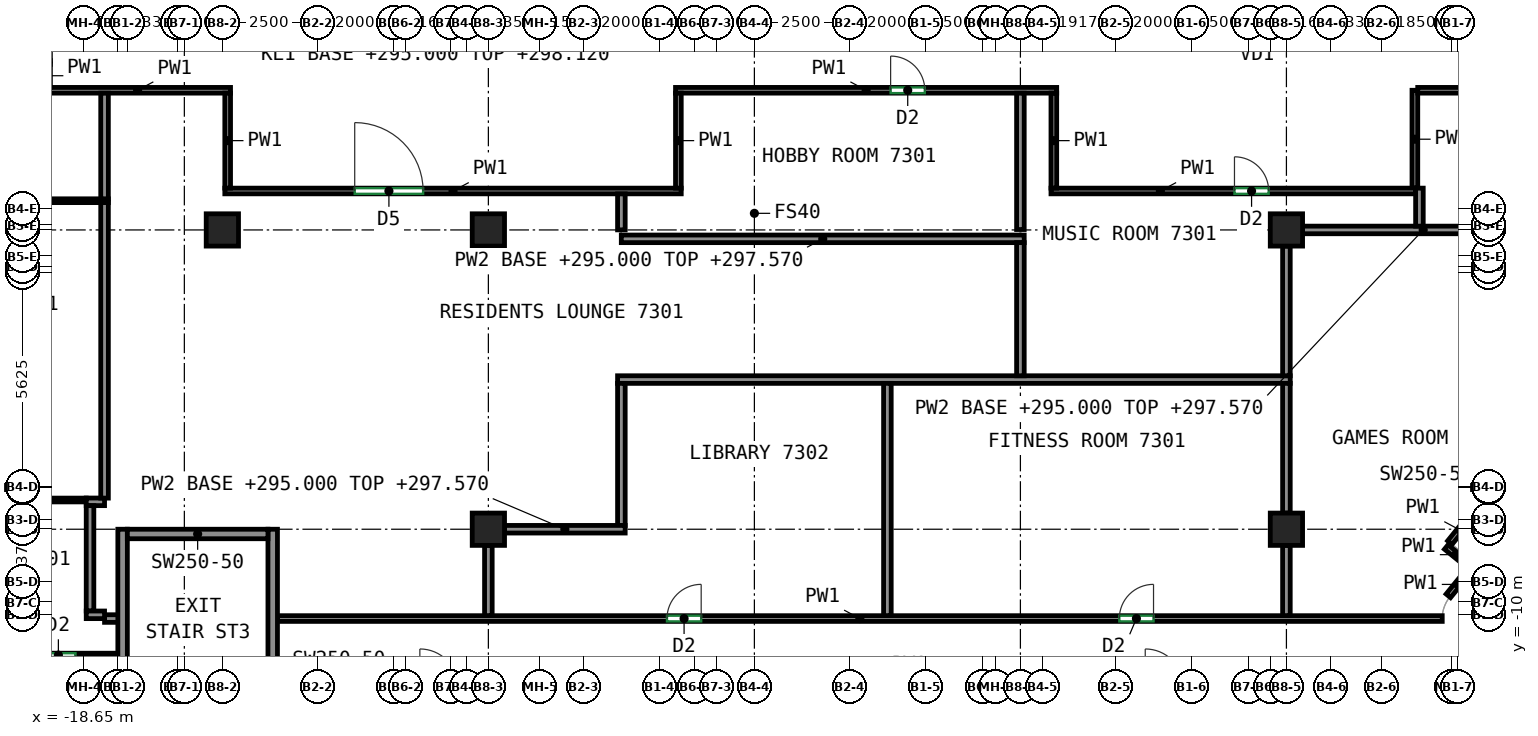
"""IFC4 building model, lengths in metres.
Left out: names, types, materials, properties, quantities, classifications, styles, units other than length and angle.
Written with IfcOpenShell. Run it as: python <this file> out.ifc"""

import sys

from ifc_helpers import new_model, si_unit, direction, frame, frame_2d, origin, origin_2d, place, context, subcontext, project, spatial, rectangle, extrude, source, transform, mapped, element, fill, save


model = new_model("IFC4")
c1 = context("Model", 3, precision=1e-05, world=origin(), true_north=direction((0.0, 1.0)))
c2 = subcontext(c1, "Body", "Model", "MODEL_VIEW")
j1 = project(units=[si_unit("LENGTHUNIT", "METRE"), si_unit("PLANEANGLEUNIT", "RADIAN")], contexts=[c1])
p1 = place(None, origin())
s1 = spatial("IfcSite", under=j1, at=p1, CompositionType="ELEMENT")
p2 = place(p1, origin())
s2 = spatial("IfcBuilding", under=s1, at=p2, CompositionType="ELEMENT")
p3 = place(p2, frame((0.0, 0.0, 295.0)))
s3 = spatial("IfcBuildingStorey", under=s2, at=p3, CompositionType="ELEMENT", Elevation=295.0)
m1 = source(origin(), c2, "Body", "SweptSolid", [
    extrude(rectangle(XDim=0.85, YDim=0.85, at=origin_2d()), origin(), (0.0, 0.0, 1.0), 3.12),
])
for number, where, z_axis, x_axis in (
    (1, (-15.0, 0.125, 0.0), (0.0, 0.0, 1.0), (1.0, 0.0, 0.0)),
    (2, (-8.0, -7.75, 0.0), (0.0, 0.0, 1.0), (1.0, 0.0, 0.0)),
    (3, (-8.0, 0.125, 0.0), (0.0, 0.0, 1.0), (1.0, 0.0, 0.0)),
    (4, (13.0, -7.75, 0.0), (0.0, 0.0, 1.0), (1.0, 0.0, 0.0)),
    (5, (13.0, 0.125, 0.0), (0.0, 0.0, 1.0), (1.0, 0.0, 0.0)),
):
    element("IfcColumn", number, at=place(p3, frame(where, z_axis=z_axis, x_axis=x_axis)), inside=s3, PredefinedType="COLUMN", context=c2, shape_type="MappedRepresentation", body=[
        mapped(m1, transform((0.0, 0.0, 0.0))),
    ])
m2 = source(origin(), c2, "Body", "SweptSolid", [
    extrude(rectangle(XDim=8.0, YDim=0.25, at=frame_2d((4.0, 0.0))), origin(), (0.0, 0.0, 1.0), 3.12),
])
for number, where, z_axis, x_axis in (
    (6, (-17.625, -15.75, 0.0), (0.0, 0.0, 1.0), (0.0, 1.0, 0.0)),
    (7, (-13.675, -15.75, 0.0), (0.0, 0.0, 1.0), (0.0, 1.0, 0.0)),
):
    element("IfcWall", number, at=place(p3, frame(where, z_axis=z_axis, x_axis=x_axis)), inside=s3, PredefinedType="SHEAR", context=c2, shape_type="MappedRepresentation", body=[
        mapped(m2, transform((0.0, 0.0, 0.0))),
    ])
m3 = source(origin(), c2, "Body", "SweptSolid", [
    extrude(rectangle(XDim=3.7, YDim=0.25, at=frame_2d((1.85, 0.0))), origin(), (0.0, 0.0, 1.0), 3.12),
])
p4 = place(p3, frame((-17.5, -7.875, 0.0), z_axis=(0.0, 0.0, 1.0), x_axis=(1.0, 0.0, 0.0)))
e8 = element("IfcWall", 8, at=p4, inside=s3, PredefinedType="SHEAR", context=c2, shape_type="MappedRepresentation", body=[
    mapped(m3, transform((0.0, 0.0, 0.0))),
])
p5 = place(p3, frame((-19.675, 3.8, 0.0), z_axis=(0.0, 0.0, 1.0), x_axis=(1.0, 0.0, 0.0)))
e9 = element("IfcWall", 9, at=p5, inside=s3, PredefinedType="PARTITIONING", context=c2, shape_type="SweptSolid", body=[
    extrude(rectangle(XDim=4.89, YDim=0.15, at=frame_2d((2.445, 0.0))), origin(), (0.0, 0.0, 1.0), 3.12),
])
p6 = place(p3, frame((-14.935, 1.15, 0.0), z_axis=(0.0, 0.0, 1.0), x_axis=(1.0, 0.0, 0.0)))
e10 = element("IfcWall", 10, at=p6, inside=s3, PredefinedType="PARTITIONING", context=c2, shape_type="SweptSolid", body=[
    extrude(rectangle(XDim=12.01, YDim=0.15, at=frame_2d((6.005, 0.0))), origin(), (0.0, 0.0, 1.0), 3.12),
])
p7 = place(p6, frame((3.418, 0.0, 0.0)))
e11 = element("IfcOpeningElement", 11, at=p7, cuts=e10, PredefinedType="OPENING", context=c2, shape_type="SweptSolid", body=[
    extrude(rectangle(XDim=1.8, YDim=2.1, at=frame_2d((0.9, 1.05))), frame((0.0, 0.085, 0.0), z_axis=(0.0, -1.0, 0.0), x_axis=(1.0, 0.0, 0.0)), (0.0, 0.0, 1.0), 0.17),
])
p8 = place(p3, frame((-14.86, 3.725, 0.0), z_axis=(0.0, 0.0, 1.0), x_axis=(0.0, -1.0, 0.0)))
e12 = element("IfcWall", 12, at=p8, inside=s3, PredefinedType="PARTITIONING", context=c2, shape_type="SweptSolid", body=[
    extrude(rectangle(XDim=2.5, YDim=0.15, at=frame_2d((1.25, 0.0))), origin(), (0.0, 0.0, 1.0), 3.12),
])
p9 = place(p3, frame((-13.55, -10.1, 0.0), z_axis=(0.0, 0.0, 1.0), x_axis=(1.0, 0.0, 0.0)))
e13 = element("IfcWall", 13, at=p9, inside=s3, PredefinedType="PARTITIONING", context=c2, shape_type="SweptSolid", body=[
    extrude(rectangle(XDim=30.65, YDim=0.15, at=frame_2d((15.325, 0.0))), origin(), (0.0, 0.0, 1.0), 3.12),
])
p10 = place(p9, frame((10.25, 0.0, 0.0)))
e14 = element("IfcOpeningElement", 14, at=p10, cuts=e13, PredefinedType="OPENING", context=c2, shape_type="SweptSolid", body=[
    extrude(rectangle(XDim=0.9, YDim=2.1, at=frame_2d((0.45, 1.05))), frame((0.0, 0.085, 0.0), z_axis=(0.0, -1.0, 0.0), x_axis=(1.0, 0.0, 0.0)), (0.0, 0.0, 1.0), 0.17),
])
p11 = place(p9, frame((22.153, 0.0, 0.0)))
e15 = element("IfcOpeningElement", 15, at=p11, cuts=e13, PredefinedType="OPENING", context=c2, shape_type="SweptSolid", body=[
    extrude(rectangle(XDim=0.9, YDim=2.1, at=frame_2d((0.45, 1.05))), frame((0.0, 0.085, 0.0), z_axis=(0.0, -1.0, 0.0), x_axis=(1.0, 0.0, 0.0)), (0.0, 0.0, 1.0), 0.17),
])
p12 = place(p3, frame((-3.075, 3.8, 0.0), z_axis=(0.0, 0.0, 1.0), x_axis=(1.0, 0.0, 0.0)))
e16 = element("IfcWall", 16, at=p12, inside=s3, PredefinedType="PARTITIONING", context=c2, shape_type="SweptSolid", body=[
    extrude(rectangle(XDim=10.03, YDim=0.15, at=frame_2d((5.015, 0.0))), origin(), (0.0, 0.0, 1.0), 3.12),
])
p13 = place(p12, frame((5.66, 0.0, 0.0)))
e17 = element("IfcOpeningElement", 17, at=p13, cuts=e16, PredefinedType="OPENING", context=c2, shape_type="SweptSolid", body=[
    extrude(rectangle(XDim=0.9, YDim=2.1, at=frame_2d((0.45, 1.05))), frame((0.0, 0.085, 0.0), z_axis=(0.0, -1.0, 0.0), x_axis=(1.0, 0.0, 0.0)), (0.0, 0.0, 1.0), 0.17),
])
p14 = place(p3, frame((-3.0, 1.225, 0.0), z_axis=(0.0, 0.0, 1.0), x_axis=(0.0, 1.0, 0.0)))
e18 = element("IfcWall", 18, at=p14, inside=s3, PredefinedType="PARTITIONING", context=c2, shape_type="SweptSolid", body=[
    extrude(rectangle(XDim=2.5, YDim=0.15, at=frame_2d((1.25, 0.0))), origin(), (0.0, 0.0, 1.0), 3.12),
])
p15 = place(p3, frame((16.38, 1.225, 0.0), z_axis=(0.0, 0.0, 1.0), x_axis=(0.0, 1.0, 0.0)))
e19 = element("IfcWall", 19, at=p15, inside=s3, PredefinedType="PARTITIONING", context=c2, shape_type="SweptSolid", body=[
    extrude(rectangle(XDim=2.575, YDim=0.15, at=frame_2d((1.288, 0.0))), origin(), (0.0, 0.0, 1.0), 3.12),
])
p16 = place(p3, frame((6.805, 1.15, 0.0), z_axis=(0.0, 0.0, 1.0), x_axis=(1.0, 0.0, 0.0)))
e20 = element("IfcWall", 20, at=p16, inside=s3, PredefinedType="PARTITIONING", context=c2, shape_type="SweptSolid", body=[
    extrude(rectangle(XDim=9.595, YDim=0.15, at=frame_2d((4.797, 0.0))), origin(), (0.0, 0.0, 1.0), 3.12),
])
p17 = place(p16, frame((4.828, 0.0, 0.0)))
e21 = element("IfcOpeningElement", 21, at=p17, cuts=e20, PredefinedType="OPENING", context=c2, shape_type="SweptSolid", body=[
    extrude(rectangle(XDim=0.9, YDim=2.1, at=frame_2d((0.45, 1.05))), frame((0.0, 0.085, 0.0), z_axis=(0.0, -1.0, 0.0), x_axis=(1.0, 0.0, 0.0)), (0.0, 0.0, 1.0), 0.17),
])
p18 = place(p3, frame((6.88, 3.725, 0.0), z_axis=(0.0, 0.0, 1.0), x_axis=(0.0, -1.0, 0.0)))
e22 = element("IfcWall", 22, at=p18, inside=s3, PredefinedType="PARTITIONING", context=c2, shape_type="SweptSolid", body=[
    extrude(rectangle(XDim=2.5, YDim=0.15, at=frame_2d((1.25, 0.0))), origin(), (0.0, 0.0, 1.0), 3.12),
])
p19 = place(p3, frame((17.748, -8.902, 0.0), z_axis=(0.0, 0.0, 1.0), x_axis=(-0.630342797145, -0.776316918589, 0.0)))
e23 = element("IfcWall", 23, at=p19, inside=s3, PredefinedType="PARTITIONING", context=c2, shape_type="SweptSolid", body=[
    extrude(rectangle(XDim=0.773, YDim=0.15, at=frame_2d((0.386, 0.0))), origin(), (0.0, 0.0, 1.0), 3.12),
])
p20 = place(p3, frame((17.206, -8.218, 0.0), z_axis=(0.0, 0.0, 1.0), x_axis=(0.776102288291, -0.630607039376, 0.0)))
e24 = element("IfcWall", 24, at=p20, inside=s3, PredefinedType="PARTITIONING", context=c2, shape_type="SweptSolid", body=[
    extrude(rectangle(XDim=0.638, YDim=0.15, at=frame_2d((0.319, 0.0))), origin(), (0.0, 0.0, 1.0), 3.12),
])
p21 = place(p3, frame((17.835, -7.442, 0.0), z_axis=(0.0, 0.0, 1.0), x_axis=(-0.628859024249, -0.777519342281, 0.0)))
e25 = element("IfcWall", 25, at=p21, inside=s3, PredefinedType="PARTITIONING", context=c2, shape_type="SweptSolid", body=[
    extrude(rectangle(XDim=0.849, YDim=0.15, at=frame_2d((0.425, 0.0))), origin(), (0.0, 0.0, 1.0), 3.12),
])
p22 = place(p3, frame((16.455, 3.8, 0.0), z_axis=(0.0, 0.0, 1.0), x_axis=(1.0, 0.0, 0.0)))
e26 = element("IfcWall", 26, at=p22, inside=s3, PredefinedType="PARTITIONING", context=c2, shape_type="SweptSolid", body=[
    extrude(rectangle(XDim=3.32, YDim=0.15, at=frame_2d((1.66, 0.0))), origin(), (0.0, 0.0, 1.0), 3.12),
])
p23 = place(p3, frame((-17.75, -11.062, 0.0), z_axis=(0.0, 0.0, 1.0), x_axis=(-1.0, 0.0, 0.0)))
e27 = element("IfcWall", 27, at=p23, inside=s3, PredefinedType="PARTITIONING", context=c2, shape_type="SweptSolid", body=[
    extrude(rectangle(XDim=7.5, YDim=0.1, at=frame_2d((3.75, 0.0))), origin(), (0.0, 0.0, 1.0), 3.12),
])
p24 = place(p23, frame((1.115, 0.0, 0.0)))
e28 = element("IfcOpeningElement", 28, at=p24, cuts=e27, PredefinedType="OPENING", context=c2, shape_type="SweptSolid", body=[
    extrude(rectangle(XDim=0.9, YDim=2.1, at=frame_2d((0.45, 1.05))), frame((0.0, 0.06, 0.0), z_axis=(0.0, -1.0, 0.0), x_axis=(1.0, 0.0, 0.0)), (0.0, 0.0, 1.0), 0.12),
])
p25 = place(p3, frame((-18.582, -6.981, 0.0), z_axis=(0.0, 0.0, 1.0), x_axis=(-1.0, 0.0, 0.0)))
e29 = element("IfcWall", 29, at=p25, inside=s3, PredefinedType="PARTITIONING", context=c2, shape_type="SweptSolid", body=[
    extrude(rectangle(XDim=6.668, YDim=0.1, at=frame_2d((3.334, 0.0))), origin(), (0.0, 0.0, 1.0), 3.12),
])
p26 = place(p25, frame((3.249, 0.0, 0.0)))
e30 = element("IfcOpeningElement", 30, at=p26, cuts=e29, PredefinedType="OPENING", context=c2, shape_type="SweptSolid", body=[
    extrude(rectangle(XDim=0.9, YDim=2.1, at=frame_2d((0.45, 1.05))), frame((0.0, 0.06, 0.0), z_axis=(0.0, -1.0, 0.0), x_axis=(1.0, 0.0, 0.0)), (0.0, 0.0, 1.0), 0.12),
])
p27 = place(p3, frame((-17.7, -10.1, 0.0), z_axis=(0.0, 0.0, 1.0), x_axis=(-1.0, 0.0, 0.0)))
e31 = element("IfcWall", 31, at=p27, inside=s3, PredefinedType="PARTITIONING", context=c2, shape_type="SweptSolid", body=[
    extrude(rectangle(XDim=0.4, YDim=0.2, at=frame_2d((0.2, 0.0))), origin(), (0.0, 0.0, 1.0), 3.12),
])
p28 = place(p3, frame((-18.582, -7.029, 0.0), z_axis=(0.0, 0.0, 1.0), x_axis=(1.0, 0.0, 0.0)))
e32 = element("IfcWall", 32, at=p28, inside=s3, PredefinedType="PARTITIONING", context=c2, shape_type="SweptSolid", body=[
    extrude(rectangle(XDim=0.482, YDim=0.2, at=frame_2d((0.241, 0.0))), origin(), (0.0, 0.0, 1.0), 3.12),
])
p29 = place(p3, frame((-18.482, -9.902, 0.0), z_axis=(0.0, 0.0, 1.0), x_axis=(0.0, 1.0, 0.0)))
e33 = element("IfcWall", 33, at=p29, inside=s3, PredefinedType="PARTITIONING", context=c2, shape_type="SweptSolid", body=[
    extrude(rectangle(XDim=2.773, YDim=0.2, at=frame_2d((1.387, 0.0))), origin(), (0.0, 0.0, 1.0), 3.12),
])
p30 = place(p3, frame((-18.1, -10.002, 0.0), z_axis=(0.0, 0.0, 1.0), x_axis=(-1.0, 0.0, 0.0)))
e34 = element("IfcWall", 34, at=p30, inside=s3, PredefinedType="PARTITIONING", context=c2, shape_type="SweptSolid", body=[
    extrude(rectangle(XDim=0.482, YDim=0.2, at=frame_2d((0.241, 0.0))), origin(), (0.0, 0.0, 1.0), 3.12),
])
p31 = place(p3, frame((-18.0, 0.894, 0.0), z_axis=(0.0, 0.0, 1.0), x_axis=(-1.0, 0.0, 0.0)))
e35 = element("IfcWall", 35, at=p31, inside=s3, PredefinedType="PARTITIONING", context=c2, shape_type="SweptSolid", body=[
    extrude(rectangle(XDim=7.25, YDim=0.1, at=frame_2d((3.625, 0.0))), origin(), (0.0, 0.0, 1.0), 3.12),
])
p32 = place(p31, frame((4.335, 0.0, 0.0)))
e36 = element("IfcOpeningElement", 36, at=p32, cuts=e35, PredefinedType="OPENING", context=c2, shape_type="SweptSolid", body=[
    extrude(rectangle(XDim=0.9, YDim=2.1, at=frame_2d((0.45, 1.05))), frame((0.0, 0.06, 0.0), z_axis=(0.0, -1.0, 0.0), x_axis=(1.0, 0.0, 0.0)), (0.0, 0.0, 1.0), 0.12),
])
p33 = place(p3, frame((-18.1, -6.931, 0.0), z_axis=(0.0, 0.0, 1.0), x_axis=(0.0, 1.0, 0.0)))
e37 = element("IfcWall", 37, at=p33, inside=s3, PredefinedType="PARTITIONING", context=c2, shape_type="SweptSolid", body=[
    extrude(rectangle(XDim=7.775, YDim=0.2, at=frame_2d((3.887, 0.0))), origin(), (0.0, 0.0, 1.0), 3.12),
])
p34 = place(p3, frame((-18.1, 0.944, 0.0), z_axis=(0.0, 0.0, 1.0), x_axis=(0.0, 1.0, 0.0)))
e38 = element("IfcWall", 38, at=p34, inside=s3, PredefinedType="PARTITIONING", context=c2, shape_type="SweptSolid", body=[
    extrude(rectangle(XDim=2.779, YDim=0.2, at=frame_2d((1.389, 0.0))), origin(), (0.0, 0.0, 1.0), 3.12),
])
p35 = place(p3, frame((-4.6, -3.812, 0.0), z_axis=(0.0, 0.0, 1.0), x_axis=(1.0, 0.0, 0.0)))
e39 = element("IfcWall", 39, at=p35, inside=s3, PredefinedType="PARTITIONING", context=c2, shape_type="SweptSolid", body=[
    extrude(rectangle(XDim=17.7, YDim=0.2, at=frame_2d((8.85, 0.0))), origin(), (0.0, 0.0, 1.0), 3.12),
])
p36 = place(p3, frame((-4.5, -7.65, 0.0), z_axis=(0.0, 0.0, 1.0), x_axis=(0.0, 1.0, 0.0)))
e40 = element("IfcWall", 40, at=p36, inside=s3, PredefinedType="PARTITIONING", context=c2, shape_type="SweptSolid", body=[
    extrude(rectangle(XDim=3.738, YDim=0.2, at=frame_2d((1.869, 0.0))), origin(), (0.0, 0.0, 1.0), 3.12),
])
p37 = place(p3, frame((-7.575, -7.75, 0.0), z_axis=(0.0, 0.0, 1.0), x_axis=(1.0, 0.0, 0.0)))
e41 = element("IfcWall", 41, at=p37, inside=s3, PredefinedType="PARTITIONING", context=c2, shape_type="SweptSolid", body=[
    extrude(rectangle(XDim=3.175, YDim=0.2, at=frame_2d((1.587, 0.0))), origin(), (0.0, 0.0, 1.0), 2.57),
])
p38 = place(p3, frame((-8.0, -10.023, 0.0), z_axis=(0.0, 0.0, 1.0), x_axis=(0.0, 1.0, 0.0)))
e42 = element("IfcWall", 42, at=p38, inside=s3, PredefinedType="PARTITIONING", context=c2, shape_type="SweptSolid", body=[
    extrude(rectangle(XDim=1.848, YDim=0.2, at=frame_2d((0.924, 0.0))), origin(), (0.0, 0.0, 1.0), 3.12),
])
p39 = place(p3, frame((-4.5, 0.127, 0.0), z_axis=(0.0, 0.0, 1.0), x_axis=(0.0, 1.0, 0.0)))
e43 = element("IfcWall", 43, at=p39, inside=s3, PredefinedType="PARTITIONING", context=c2, shape_type="SweptSolid", body=[
    extrude(rectangle(XDim=0.946, YDim=0.2, at=frame_2d((0.473, 0.0))), origin(), (0.0, 0.0, 1.0), 3.12),
])
p40 = place(p3, frame((6.1, -0.109, 0.0), z_axis=(0.0, 0.0, 1.0), x_axis=(-1.0, 0.0, 0.0)))
e44 = element("IfcWall", 44, at=p40, inside=s3, PredefinedType="PARTITIONING", context=c2, shape_type="SweptSolid", body=[
    extrude(rectangle(XDim=10.602, YDim=0.2, at=frame_2d((5.301, 0.0))), origin(), (0.0, 0.0, 1.0), 2.57),
])
p41 = place(p3, frame((6.0, -3.712, 0.0), z_axis=(0.0, 0.0, 1.0), x_axis=(0.0, 1.0, 0.0)))
e45 = element("IfcWall", 45, at=p41, inside=s3, PredefinedType="PARTITIONING", context=c2, shape_type="SweptSolid", body=[
    extrude(rectangle(XDim=3.503, YDim=0.2, at=frame_2d((1.751, 0.0))), origin(), (0.0, 0.0, 1.0), 3.12),
])
p42 = place(p3, frame((2.5, -10.023, 0.0), z_axis=(0.0, 0.0, 1.0), x_axis=(0.0, 1.0, 0.0)))
e46 = element("IfcWall", 46, at=p42, inside=s3, PredefinedType="PARTITIONING", context=c2, shape_type="SweptSolid", body=[
    extrude(rectangle(XDim=6.111, YDim=0.2, at=frame_2d((3.055, 0.0))), origin(), (0.0, 0.0, 1.0), 3.12),
])
p43 = place(p3, frame((6.0, 0.136, 0.0), z_axis=(0.0, 0.0, 1.0), x_axis=(0.0, 1.0, 0.0)))
e47 = element("IfcWall", 47, at=p43, inside=s3, PredefinedType="PARTITIONING", context=c2, shape_type="SweptSolid", body=[
    extrude(rectangle(XDim=3.587, YDim=0.2, at=frame_2d((1.793, 0.0))), origin(), (0.0, 0.0, 1.0), 3.12),
])
p44 = place(p3, frame((13.0, -7.325, 0.0), z_axis=(0.0, 0.0, 1.0), x_axis=(0.0, 1.0, 0.0)))
e48 = element("IfcWall", 48, at=p44, inside=s3, PredefinedType="PARTITIONING", context=c2, shape_type="SweptSolid", body=[
    extrude(rectangle(XDim=3.413, YDim=0.2, at=frame_2d((1.707, 0.0))), origin(), (0.0, 0.0, 1.0), 3.12),
])
p45 = place(p3, frame((13.0, -10.023, 0.0), z_axis=(0.0, 0.0, 1.0), x_axis=(0.0, 1.0, 0.0)))
e49 = element("IfcWall", 49, at=p45, inside=s3, PredefinedType="PARTITIONING", context=c2, shape_type="SweptSolid", body=[
    extrude(rectangle(XDim=1.848, YDim=0.2, at=frame_2d((0.924, 0.0))), origin(), (0.0, 0.0, 1.0), 3.12),
])
p46 = place(p3, frame((13.425, 0.125, 0.0), z_axis=(0.0, 0.0, 1.0), x_axis=(1.0, 0.0, 0.0)))
e50 = element("IfcWall", 50, at=p46, inside=s3, PredefinedType="PARTITIONING", context=c2, shape_type="SweptSolid", body=[
    extrude(rectangle(XDim=6.348, YDim=0.2, at=frame_2d((3.174, 0.0))), origin(), (0.0, 0.0, 1.0), 2.57),
])
p47 = place(p3, frame((13.0, -3.712, 0.0), z_axis=(0.0, 0.0, 1.0), x_axis=(0.0, 1.0, 0.0)))
e51 = element("IfcWall", 51, at=p47, inside=s3, PredefinedType="PARTITIONING", context=c2, shape_type="SweptSolid", body=[
    extrude(rectangle(XDim=3.412, YDim=0.2, at=frame_2d((1.706, 0.0))), origin(), (0.0, 0.0, 1.0), 3.12),
])
p48 = place(p3, frame((16.5, 0.225, 0.0), z_axis=(0.0, 0.0, 1.0), x_axis=(0.0, 1.0, 0.0)))
e52 = element("IfcWall", 52, at=p48, inside=s3, PredefinedType="PARTITIONING", context=c2, shape_type="SweptSolid", body=[
    extrude(rectangle(XDim=1.0, YDim=0.2, at=frame_2d((0.5, 0.0))), origin(), (0.0, 0.0, 1.0), 3.12),
])
p49 = place(p24, origin())
e53 = element("IfcDoor", 53, at=p49, inside=s3, OperationType="SINGLE_SWING_LEFT", PredefinedType="DOOR", context=c2, shape_type="SweptSolid", body=[
    extrude(rectangle(XDim=0.9, YDim=2.1, at=frame_2d((0.45, 1.05))), frame((0.0, 0.025, 0.0), z_axis=(0.0, -1.0, 0.0), x_axis=(1.0, 0.0, 0.0)), (0.0, 0.0, 1.0), 0.05),
])
fill(e28, e53)
p50 = place(p10, origin())
e54 = element("IfcDoor", 54, at=p50, inside=s3, OperationType="SINGLE_SWING_RIGHT", PredefinedType="DOOR", context=c2, shape_type="SweptSolid", body=[
    extrude(rectangle(XDim=0.9, YDim=2.1, at=frame_2d((0.45, 1.05))), frame((0.0, 0.025, 0.0), z_axis=(0.0, -1.0, 0.0), x_axis=(1.0, 0.0, 0.0)), (0.0, 0.0, 1.0), 0.05),
])
fill(e14, e54)
p51 = place(p11, origin())
e55 = element("IfcDoor", 55, at=p51, inside=s3, OperationType="SINGLE_SWING_RIGHT", PredefinedType="DOOR", context=c2, shape_type="SweptSolid", body=[
    extrude(rectangle(XDim=0.9, YDim=2.1, at=frame_2d((0.45, 1.05))), frame((0.0, 0.025, 0.0), z_axis=(0.0, -1.0, 0.0), x_axis=(1.0, 0.0, 0.0)), (0.0, 0.0, 1.0), 0.05),
])
fill(e15, e55)
p52 = place(p7, origin())
e56 = element("IfcDoor", 56, at=p52, inside=s3, OperationType="DOUBLE_DOOR_SINGLE_SWING", PredefinedType="DOOR", context=c2, shape_type="SweptSolid", body=[
    extrude(rectangle(XDim=1.8, YDim=2.1, at=frame_2d((0.9, 1.05))), frame((0.0, 0.025, 0.0), z_axis=(0.0, -1.0, 0.0), x_axis=(1.0, 0.0, 0.0)), (0.0, 0.0, 1.0), 0.05),
])
fill(e11, e56)
p53 = place(p17, origin())
e57 = element("IfcDoor", 57, at=p53, inside=s3, OperationType="SINGLE_SWING_LEFT", PredefinedType="DOOR", context=c2, shape_type="SweptSolid", body=[
    extrude(rectangle(XDim=0.9, YDim=2.1, at=frame_2d((0.45, 1.05))), frame((0.0, 0.025, 0.0), z_axis=(0.0, -1.0, 0.0), x_axis=(1.0, 0.0, 0.0)), (0.0, 0.0, 1.0), 0.05),
])
fill(e21, e57)
p54 = place(p13, origin())
e58 = element("IfcDoor", 58, at=p54, inside=s3, OperationType="SINGLE_SWING_LEFT", PredefinedType="DOOR", context=c2, shape_type="SweptSolid", body=[
    extrude(rectangle(XDim=0.9, YDim=2.1, at=frame_2d((0.45, 1.05))), frame((0.0, 0.025, 0.0), z_axis=(0.0, -1.0, 0.0), x_axis=(1.0, 0.0, 0.0)), (0.0, 0.0, 1.0), 0.05),
])
fill(e17, e58)
save(model, sys.argv[1])
